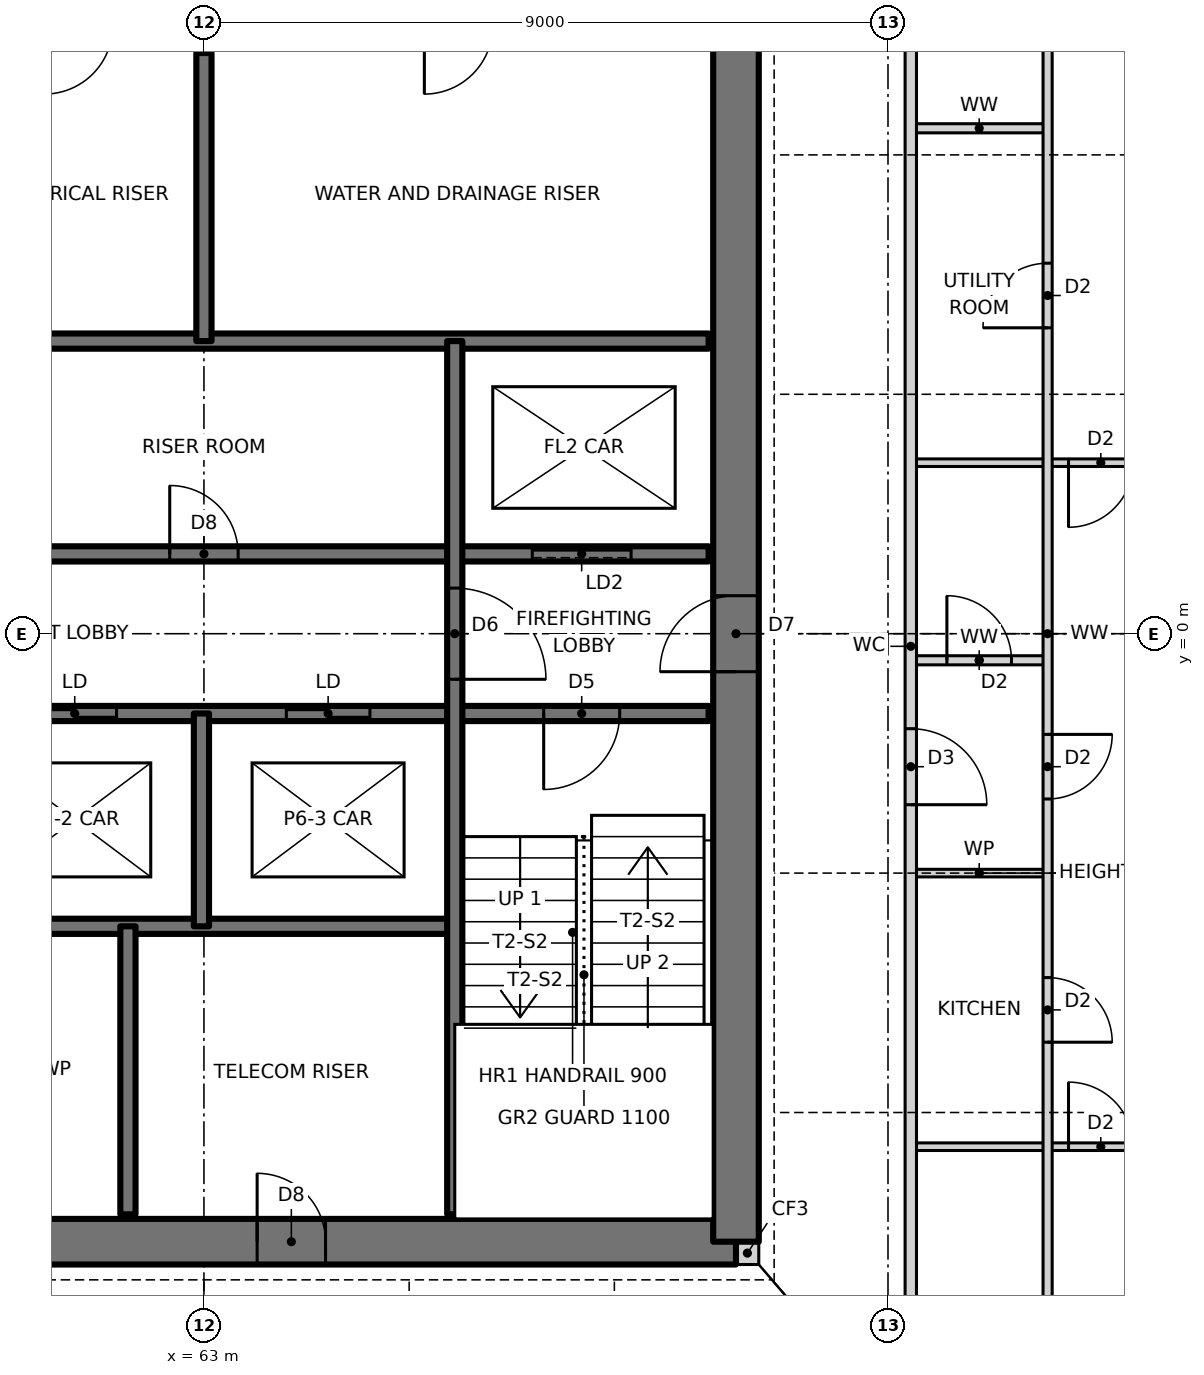
"""IFC4 building model, lengths in metres.
Left out: names, types, materials, properties, quantities, classifications, styles, units other than length and angle.
Written with IfcOpenShell. Run it as: python <this file> out.ifc"""

import sys

from ifc_helpers import new_model, si_unit, direction, frame, frame_2d, origin, place, context, subcontext, project, spatial, rectangle, extrude, element, fill, save


model = new_model("IFC4")
c1 = context("Model", 3, precision=1e-05, world=origin(), true_north=direction((0.0, 1.0)))
c2 = subcontext(c1, "Body", "Model", "MODEL_VIEW")
j1 = project(units=[si_unit("LENGTHUNIT", "METRE"), si_unit("PLANEANGLEUNIT", "RADIAN")], contexts=[c1])
p1 = place(None, origin())
s1 = spatial("IfcSite", under=j1, at=p1, CompositionType="ELEMENT")
p2 = place(p1, origin())
s2 = spatial("IfcBuilding", under=s1, at=p2, CompositionType="ELEMENT")
p3 = place(p2, frame((0.0, 0.0, 18.5)))
s3 = spatial("IfcBuildingStorey", under=s2, at=p3, CompositionType="ELEMENT", Elevation=18.5)
p4 = place(p3, frame((70.0, -8.15, 0.0), z_axis=(0.0, 0.0, 1.0), x_axis=(1.0, 0.0, 0.0)))
e1 = element("IfcWall", 1, at=p4, inside=s3, PredefinedType="SOLIDWALL", context=c2, shape_type="SweptSolid", body=[
    extrude(rectangle(XDim=0.3, YDim=0.3, at=frame_2d((0.15, 0.0))), origin(), (0.0, 0.0, 1.0), 3.5),
])
p5 = place(p3, frame((56.0, -8.0, 0.0), z_axis=(0.0, 0.0, 1.0), x_axis=(1.0, 0.0, 0.0)))
e2 = element("IfcWall", 2, at=p5, inside=s3, PredefinedType="SHEAR", context=c2, shape_type="SweptSolid", body=[
    extrude(rectangle(XDim=14.0, YDim=0.6, at=frame_2d((7.0, 0.0))), origin(), (0.0, 0.0, 1.0), 3.5),
])
p6 = place(p5, frame((2.7, 0.0, 0.0)))
e3 = element("IfcOpeningElement", 3, at=p6, cuts=e2, PredefinedType="OPENING", context=c2, shape_type="SweptSolid", body=[
    extrude(rectangle(XDim=0.9, YDim=2.1, at=frame_2d((0.45, 1.05))), frame((0.0, 0.31, 0.0), z_axis=(0.0, -1.0, 0.0), x_axis=(1.0, 0.0, 0.0)), (0.0, 0.0, 1.0), 0.62),
])
p7 = place(p5, frame((7.7, 0.0, 0.0)))
e4 = element("IfcOpeningElement", 4, at=p7, cuts=e2, PredefinedType="OPENING", context=c2, shape_type="SweptSolid", body=[
    extrude(rectangle(XDim=0.9, YDim=2.1, at=frame_2d((0.45, 1.05))), frame((0.0, 0.31, 0.0), z_axis=(0.0, -1.0, 0.0), x_axis=(1.0, 0.0, 0.0)), (0.0, 0.0, 1.0), 0.62),
])
p8 = place(p3, frame((70.0, -8.0, 0.0), z_axis=(0.0, 0.0, 1.0), x_axis=(0.0, 1.0, 0.0)))
e5 = element("IfcWall", 5, at=p8, inside=s3, PredefinedType="SHEAR", context=c2, shape_type="SweptSolid", body=[
    extrude(rectangle(XDim=16.0, YDim=0.6, at=frame_2d((8.0, 0.0))), origin(), (0.0, 0.0, 1.0), 3.5),
])
p9 = place(p8, frame((7.5, 0.0, 0.0)))
e6 = element("IfcOpeningElement", 6, at=p9, cuts=e5, PredefinedType="OPENING", context=c2, shape_type="SweptSolid", body=[
    extrude(rectangle(XDim=1.0, YDim=2.1, at=frame_2d((0.5, 1.05))), frame((0.0, 0.31, 0.0), z_axis=(0.0, -1.0, 0.0), x_axis=(1.0, 0.0, 0.0)), (0.0, 0.0, 1.0), 0.62),
])
p10 = place(p3, frame((72.3, -6.75, 0.0), z_axis=(0.0, 0.0, 1.0), x_axis=(1.0, 0.0, 0.0)))
e7 = element("IfcWall", 7, at=p10, inside=s3, PredefinedType="PARTITIONING", context=c2, shape_type="SweptSolid", body=[
    extrude(rectangle(XDim=7.14, YDim=0.1, at=frame_2d((3.57, 0.0))), origin(), (0.0, 0.0, 1.0), 3.27),
])
p11 = place(p10, frame((2.075, 0.0, 0.0)))
e8 = element("IfcOpeningElement", 8, at=p11, cuts=e7, PredefinedType="OPENING", context=c2, shape_type="SweptSolid", body=[
    extrude(rectangle(XDim=0.85, YDim=2.1, at=frame_2d((0.425, 1.05))), frame((0.0, 0.06, 0.0), z_axis=(0.0, -1.0, 0.0), x_axis=(1.0, 0.0, 0.0)), (0.0, 0.0, 1.0), 0.12),
])
p12 = place(p3, frame((56.36, -3.85, 0.0), z_axis=(0.0, 0.0, 1.0), x_axis=(1.0, 0.0, 0.0)))
e9 = element("IfcWall", 9, at=p12, inside=s3, PredefinedType="SOLIDWALL", context=c2, shape_type="SweptSolid", body=[
    extrude(rectangle(XDim=9.94, YDim=0.2, at=frame_2d((4.97, 0.0))), origin(), (0.0, 0.0, 1.0), 3.5),
])
p13 = place(p3, frame((72.3, -3.15, 0.0), z_axis=(0.0, 0.0, 1.0), x_axis=(1.0, 0.0, 0.0)))
e10 = element("IfcWall", 10, at=p13, inside=s3, PredefinedType="PARTITIONING", context=c2, shape_type="SweptSolid", body=[
    extrude(rectangle(XDim=1.8, YDim=0.1, at=frame_2d((0.9, 0.0))), origin(), (0.0, 0.0, 1.0), 2.587),
])
p14 = place(p3, frame((56.36, -1.05, 0.0), z_axis=(0.0, 0.0, 1.0), x_axis=(1.0, 0.0, 0.0)))
e11 = element("IfcWall", 11, at=p14, inside=s3, PredefinedType="SOLIDWALL", context=c2, shape_type="SweptSolid", body=[
    extrude(rectangle(XDim=13.28, YDim=0.2, at=frame_2d((6.64, 0.0))), origin(), (0.0, 0.0, 1.0), 3.5),
])
p15 = place(p14, frame((11.11, 0.0, 0.0)))
e12 = element("IfcOpeningElement", 12, at=p15, cuts=e11, PredefinedType="OPENING", context=c2, shape_type="SweptSolid", body=[
    extrude(rectangle(XDim=1.0, YDim=2.1, at=frame_2d((0.5, 1.05))), frame((0.0, 0.11, 0.0), z_axis=(0.0, -1.0, 0.0), x_axis=(1.0, 0.0, 0.0)), (0.0, 0.0, 1.0), 0.22),
])
p16 = place(p14, frame((1.087, 0.0, 0.0)))
e13 = element("IfcOpeningElement", 13, at=p16, cuts=e11, PredefinedType="OPENING", context=c2, shape_type="SweptSolid", body=[
    extrude(rectangle(XDim=1.1, YDim=2.1, at=frame_2d((0.55, 1.05))), frame((0.0, 0.11, 0.0), z_axis=(0.0, -1.0, 0.0), x_axis=(1.0, 0.0, 0.0)), (0.0, 0.0, 1.0), 0.22),
])
p17 = place(p14, frame((4.39, 0.0, 0.0)))
e14 = element("IfcOpeningElement", 14, at=p17, cuts=e11, PredefinedType="OPENING", context=c2, shape_type="SweptSolid", body=[
    extrude(rectangle(XDim=1.1, YDim=2.1, at=frame_2d((0.55, 1.05))), frame((0.0, 0.11, 0.0), z_axis=(0.0, -1.0, 0.0), x_axis=(1.0, 0.0, 0.0)), (0.0, 0.0, 1.0), 0.22),
])
p18 = place(p14, frame((7.724, 0.0, 0.0)))
e15 = element("IfcOpeningElement", 15, at=p18, cuts=e11, PredefinedType="OPENING", context=c2, shape_type="SweptSolid", body=[
    extrude(rectangle(XDim=1.1, YDim=2.1, at=frame_2d((0.55, 1.05))), frame((0.0, 0.11, 0.0), z_axis=(0.0, -1.0, 0.0), x_axis=(1.0, 0.0, 0.0)), (0.0, 0.0, 1.0), 0.22),
])
p19 = place(p3, frame((72.3, -0.35, 0.0), z_axis=(0.0, 0.0, 1.0), x_axis=(1.0, 0.0, 0.0)))
e16 = element("IfcWall", 16, at=p19, inside=s3, PredefinedType="PARTITIONING", context=c2, shape_type="SweptSolid", body=[
    extrude(rectangle(XDim=1.8, YDim=0.12, at=frame_2d((0.9, 0.0))), origin(), (0.0, 0.0, 1.0), 3.27),
])
p20 = place(p19, frame((0.475, 0.0, 0.0)))
e17 = element("IfcOpeningElement", 17, at=p20, cuts=e16, PredefinedType="OPENING", context=c2, shape_type="SweptSolid", body=[
    extrude(rectangle(XDim=0.85, YDim=2.1, at=frame_2d((0.425, 1.05))), frame((0.0, 0.07, 0.0), z_axis=(0.0, -1.0, 0.0), x_axis=(1.0, 0.0, 0.0)), (0.0, 0.0, 1.0), 0.14),
])
p21 = place(p3, frame((56.36, 1.05, 0.0), z_axis=(0.0, 0.0, 1.0), x_axis=(1.0, 0.0, 0.0)))
e18 = element("IfcWall", 18, at=p21, inside=s3, PredefinedType="SOLIDWALL", context=c2, shape_type="SweptSolid", body=[
    extrude(rectangle(XDim=13.28, YDim=0.2, at=frame_2d((6.64, 0.0))), origin(), (0.0, 0.0, 1.0), 3.5),
])
p22 = place(p21, frame((1.17, 0.0, 0.0)))
e19 = element("IfcOpeningElement", 19, at=p22, cuts=e18, PredefinedType="OPENING", context=c2, shape_type="SweptSolid", body=[
    extrude(rectangle(XDim=1.0, YDim=2.1, at=frame_2d((0.5, 1.05))), frame((0.0, 0.11, 0.0), z_axis=(0.0, -1.0, 0.0), x_axis=(1.0, 0.0, 0.0)), (0.0, 0.0, 1.0), 0.22),
])
p23 = place(p21, frame((6.19, 0.0, 0.0)))
e20 = element("IfcOpeningElement", 20, at=p23, cuts=e18, PredefinedType="OPENING", context=c2, shape_type="SweptSolid", body=[
    extrude(rectangle(XDim=0.9, YDim=2.1, at=frame_2d((0.45, 1.05))), frame((0.0, 0.11, 0.0), z_axis=(0.0, -1.0, 0.0), x_axis=(1.0, 0.0, 0.0)), (0.0, 0.0, 1.0), 0.22),
])
p24 = place(p21, frame((10.96, 0.0, 0.0)))
e21 = element("IfcOpeningElement", 21, at=p24, cuts=e18, PredefinedType="OPENING", context=c2, shape_type="SweptSolid", body=[
    extrude(rectangle(XDim=1.3, YDim=2.1, at=frame_2d((0.65, 1.05))), frame((0.0, 0.11, 0.0), z_axis=(0.0, -1.0, 0.0), x_axis=(1.0, 0.0, 0.0)), (0.0, 0.0, 1.0), 0.22),
])
p25 = place(p3, frame((72.3, 2.25, 0.0), z_axis=(0.0, 0.0, 1.0), x_axis=(1.0, 0.0, 0.0)))
e22 = element("IfcWall", 22, at=p25, inside=s3, PredefinedType="PARTITIONING", context=c2, shape_type="SweptSolid", body=[
    extrude(rectangle(XDim=7.14, YDim=0.1, at=frame_2d((3.57, 0.0))), origin(), (0.0, 0.0, 1.0), 3.27),
])
p26 = place(p25, frame((2.075, 0.0, 0.0)))
e23 = element("IfcOpeningElement", 23, at=p26, cuts=e22, PredefinedType="OPENING", context=c2, shape_type="SweptSolid", body=[
    extrude(rectangle(XDim=0.85, YDim=2.1, at=frame_2d((0.425, 1.05))), frame((0.0, 0.06, 0.0), z_axis=(0.0, -1.0, 0.0), x_axis=(1.0, 0.0, 0.0)), (0.0, 0.0, 1.0), 0.12),
])
p27 = place(p3, frame((59.7, 3.85, 0.0), z_axis=(0.0, 0.0, 1.0), x_axis=(1.0, 0.0, 0.0)))
e24 = element("IfcWall", 24, at=p27, inside=s3, PredefinedType="SOLIDWALL", context=c2, shape_type="SweptSolid", body=[
    extrude(rectangle(XDim=9.94, YDim=0.2, at=frame_2d((4.97, 0.0))), origin(), (0.0, 0.0, 1.0), 3.5),
])
p28 = place(p3, frame((72.3, 6.65, 0.0), z_axis=(0.0, 0.0, 1.0), x_axis=(1.0, 0.0, 0.0)))
e25 = element("IfcWall", 25, at=p28, inside=s3, PredefinedType="PARTITIONING", context=c2, shape_type="SweptSolid", body=[
    extrude(rectangle(XDim=1.8, YDim=0.12, at=frame_2d((0.9, 0.0))), origin(), (0.0, 0.0, 1.0), 3.27),
])
p29 = place(p3, frame((74.1, -12.614, 0.0), z_axis=(0.0, 0.0, 1.0), x_axis=(0.0, 1.0, 0.0)))
e26 = element("IfcWall", 26, at=p29, inside=s3, PredefinedType="PARTITIONING", context=c2, shape_type="SweptSolid", body=[
    extrude(rectangle(XDim=25.228, YDim=0.12, at=frame_2d((12.614, 0.0))), origin(), (0.0, 0.0, 1.0), 3.27),
])
p30 = place(p29, frame((7.239, 0.0, 0.0)))
e27 = element("IfcOpeningElement", 27, at=p30, cuts=e26, PredefinedType="OPENING", context=c2, shape_type="SweptSolid", body=[
    extrude(rectangle(XDim=0.85, YDim=2.1, at=frame_2d((0.425, 1.05))), frame((0.0, 0.07, 0.0), z_axis=(0.0, -1.0, 0.0), x_axis=(1.0, 0.0, 0.0)), (0.0, 0.0, 1.0), 0.14),
])
p31 = place(p29, frame((10.439, 0.0, 0.0)))
e28 = element("IfcOpeningElement", 28, at=p31, cuts=e26, PredefinedType="OPENING", context=c2, shape_type="SweptSolid", body=[
    extrude(rectangle(XDim=0.85, YDim=2.1, at=frame_2d((0.425, 1.05))), frame((0.0, 0.07, 0.0), z_axis=(0.0, -1.0, 0.0), x_axis=(1.0, 0.0, 0.0)), (0.0, 0.0, 1.0), 0.14),
])
p32 = place(p29, frame((2.507, 0.0, 0.0)))
e29 = element("IfcOpeningElement", 29, at=p32, cuts=e26, PredefinedType="OPENING", context=c2, shape_type="SweptSolid", body=[
    extrude(rectangle(XDim=0.85, YDim=2.1, at=frame_2d((0.425, 1.05))), frame((0.0, 0.07, 0.0), z_axis=(0.0, -1.0, 0.0), x_axis=(1.0, 0.0, 0.0)), (0.0, 0.0, 1.0), 0.14),
])
p33 = place(p29, frame((16.639, 0.0, 0.0)))
e30 = element("IfcOpeningElement", 30, at=p33, cuts=e26, PredefinedType="OPENING", context=c2, shape_type="SweptSolid", body=[
    extrude(rectangle(XDim=0.85, YDim=2.1, at=frame_2d((0.425, 1.05))), frame((0.0, 0.07, 0.0), z_axis=(0.0, -1.0, 0.0), x_axis=(1.0, 0.0, 0.0)), (0.0, 0.0, 1.0), 0.14),
])
p34 = place(p29, frame((21.821, 0.0, 0.0)))
e31 = element("IfcOpeningElement", 31, at=p34, cuts=e26, PredefinedType="OPENING", context=c2, shape_type="SweptSolid", body=[
    extrude(rectangle(XDim=0.85, YDim=2.1, at=frame_2d((0.425, 1.05))), frame((0.0, 0.07, 0.0), z_axis=(0.0, -1.0, 0.0), x_axis=(1.0, 0.0, 0.0)), (0.0, 0.0, 1.0), 0.14),
])
p35 = place(p3, frame((72.3, -10.9, 0.0), z_axis=(0.0, 0.0, 1.0), x_axis=(0.0, 1.0, 0.0)))
e32 = element("IfcWall", 32, at=p35, inside=s3, PredefinedType="PARTITIONING", context=c2, shape_type="SweptSolid", body=[
    extrude(rectangle(XDim=21.468, YDim=0.15, at=frame_2d((10.734, 0.0))), origin(), (0.0, 0.0, 1.0), 3.27),
])
p36 = place(p35, frame((8.65, 0.0, 0.0)))
e33 = element("IfcOpeningElement", 33, at=p36, cuts=e32, PredefinedType="OPENING", context=c2, shape_type="SweptSolid", body=[
    extrude(rectangle(XDim=1.0, YDim=2.1, at=frame_2d((0.5, 1.05))), frame((0.0, 0.085, 0.0), z_axis=(0.0, -1.0, 0.0), x_axis=(1.0, 0.0, 0.0)), (0.0, 0.0, 1.0), 0.17),
])
p37 = place(p3, frame((66.3, -7.64, 0.0), z_axis=(0.0, 0.0, 1.0), x_axis=(0.0, 1.0, 0.0)))
e34 = element("IfcWall", 34, at=p37, inside=s3, PredefinedType="SOLIDWALL", context=c2, shape_type="SweptSolid", body=[
    extrude(rectangle(XDim=11.49, YDim=0.2, at=frame_2d((5.745, 0.0))), origin(), (0.0, 0.0, 1.0), 3.5),
])
p38 = place(p37, frame((7.04, 0.0, 0.0)))
e35 = element("IfcOpeningElement", 35, at=p38, cuts=e34, PredefinedType="OPENING", context=c2, shape_type="SweptSolid", body=[
    extrude(rectangle(XDim=1.2, YDim=2.1, at=frame_2d((0.6, 1.05))), frame((0.0, 0.11, 0.0), z_axis=(0.0, -1.0, 0.0), x_axis=(1.0, 0.0, 0.0)), (0.0, 0.0, 1.0), 0.22),
])
p39 = place(p3, frame((63.0, 3.85, 0.0), z_axis=(0.0, 0.0, 1.0), x_axis=(0.0, 1.0, 0.0)))
e36 = element("IfcWall", 36, at=p39, inside=s3, PredefinedType="SOLIDWALL", context=c2, shape_type="SweptSolid", body=[
    extrude(rectangle(XDim=3.79, YDim=0.2, at=frame_2d((1.895, 0.0))), origin(), (0.0, 0.0, 1.0), 3.5),
])
p40 = place(p3, frame((62.967, -3.85, 0.0), z_axis=(0.0, 0.0, 1.0), x_axis=(0.0, 1.0, 0.0)))
e37 = element("IfcWall", 37, at=p40, inside=s3, PredefinedType="SOLIDWALL", context=c2, shape_type="SweptSolid", body=[
    extrude(rectangle(XDim=2.8, YDim=0.2, at=frame_2d((1.4, 0.0))), origin(), (0.0, 0.0, 1.0), 3.5),
])
p41 = place(p3, frame((62.0, -7.64, 0.0), z_axis=(0.0, 0.0, 1.0), x_axis=(0.0, 1.0, 0.0)))
e38 = element("IfcWall", 38, at=p41, inside=s3, PredefinedType="SOLIDWALL", context=c2, shape_type="SweptSolid", body=[
    extrude(rectangle(XDim=3.79, YDim=0.2, at=frame_2d((1.895, 0.0))), origin(), (0.0, 0.0, 1.0), 3.5),
])
p42 = place(p15, frame((1.0, 0.0, 0.0), z_axis=(0.0, 0.0, 1.0), x_axis=(-1.0, 0.0, 0.0)))
e39 = element("IfcDoor", 39, at=p42, inside=s3, OperationType="SINGLE_SWING_RIGHT", PredefinedType="DOOR", context=c2, shape_type="SweptSolid", body=[
    extrude(rectangle(XDim=1.0, YDim=2.1, at=frame_2d((0.5, 1.05))), frame((0.0, 0.025, 0.0), z_axis=(0.0, -1.0, 0.0), x_axis=(1.0, 0.0, 0.0)), (0.0, 0.0, 1.0), 0.05),
])
fill(e12, e39)
p43 = place(p38, frame((1.2, 0.0, 0.0), z_axis=(0.0, 0.0, 1.0), x_axis=(-1.0, 0.0, 0.0)))
e40 = element("IfcDoor", 40, at=p43, inside=s3, OperationType="SINGLE_SWING_RIGHT", PredefinedType="DOOR", context=c2, shape_type="SweptSolid", body=[
    extrude(rectangle(XDim=1.2, YDim=2.1, at=frame_2d((0.6, 1.05))), frame((0.0, 0.025, 0.0), z_axis=(0.0, -1.0, 0.0), x_axis=(1.0, 0.0, 0.0)), (0.0, 0.0, 1.0), 0.05),
])
fill(e35, e40)
p44 = place(p23, origin())
e41 = element("IfcDoor", 41, at=p44, inside=s3, OperationType="SINGLE_SWING_LEFT", PredefinedType="DOOR", context=c2, shape_type="SweptSolid", body=[
    extrude(rectangle(XDim=0.9, YDim=2.1, at=frame_2d((0.45, 1.05))), frame((0.0, 0.025, 0.0), z_axis=(0.0, -1.0, 0.0), x_axis=(1.0, 0.0, 0.0)), (0.0, 0.0, 1.0), 0.05),
])
fill(e20, e41)
p45 = place(p30, frame((0.85, 0.0, 0.0), z_axis=(0.0, 0.0, 1.0), x_axis=(-1.0, 0.0, 0.0)))
e42 = element("IfcDoor", 42, at=p45, inside=s3, OperationType="SINGLE_SWING_RIGHT", PredefinedType="DOOR", context=c2, shape_type="SweptSolid", body=[
    extrude(rectangle(XDim=0.85, YDim=2.1, at=frame_2d((0.425, 1.05))), frame((0.0, 0.025, 0.0), z_axis=(0.0, -1.0, 0.0), x_axis=(1.0, 0.0, 0.0)), (0.0, 0.0, 1.0), 0.05),
])
fill(e27, e42)
p46 = place(p36, frame((1.0, 0.0, 0.0), z_axis=(0.0, 0.0, 1.0), x_axis=(-1.0, 0.0, 0.0)))
e43 = element("IfcDoor", 43, at=p46, inside=s3, OperationType="SINGLE_SWING_RIGHT", PredefinedType="DOOR", context=c2, shape_type="SweptSolid", body=[
    extrude(rectangle(XDim=1.0, YDim=2.1, at=frame_2d((0.5, 1.05))), frame((0.0, 0.025, 0.0), z_axis=(0.0, -1.0, 0.0), x_axis=(1.0, 0.0, 0.0)), (0.0, 0.0, 1.0), 0.05),
])
fill(e33, e43)
p47 = place(p31, frame((0.85, 0.0, 0.0), z_axis=(0.0, 0.0, 1.0), x_axis=(-1.0, 0.0, 0.0)))
e44 = element("IfcDoor", 44, at=p47, inside=s3, OperationType="SINGLE_SWING_LEFT", PredefinedType="DOOR", context=c2, shape_type="SweptSolid", body=[
    extrude(rectangle(XDim=0.85, YDim=2.1, at=frame_2d((0.425, 1.05))), frame((0.0, 0.025, 0.0), z_axis=(0.0, -1.0, 0.0), x_axis=(1.0, 0.0, 0.0)), (0.0, 0.0, 1.0), 0.05),
])
fill(e28, e44)
p48 = place(p20, origin())
e45 = element("IfcDoor", 45, at=p48, inside=s3, OperationType="SINGLE_SWING_LEFT", PredefinedType="DOOR", context=c2, shape_type="SweptSolid", body=[
    extrude(rectangle(XDim=0.85, YDim=2.1, at=frame_2d((0.425, 1.05))), frame((0.0, 0.025, 0.0), z_axis=(0.0, -1.0, 0.0), x_axis=(1.0, 0.0, 0.0)), (0.0, 0.0, 1.0), 0.05),
])
fill(e17, e45)
p49 = place(p11, origin())
e46 = element("IfcDoor", 46, at=p49, inside=s3, OperationType="SINGLE_SWING_LEFT", PredefinedType="DOOR", context=c2, shape_type="SweptSolid", body=[
    extrude(rectangle(XDim=0.85, YDim=2.1, at=frame_2d((0.425, 1.05))), frame((0.0, 0.025, 0.0), z_axis=(0.0, -1.0, 0.0), x_axis=(1.0, 0.0, 0.0)), (0.0, 0.0, 1.0), 0.05),
])
fill(e8, e46)
p50 = place(p26, frame((0.85, 0.0, 0.0), z_axis=(0.0, 0.0, 1.0), x_axis=(-1.0, 0.0, 0.0)))
e47 = element("IfcDoor", 47, at=p50, inside=s3, OperationType="SINGLE_SWING_RIGHT", PredefinedType="DOOR", context=c2, shape_type="SweptSolid", body=[
    extrude(rectangle(XDim=0.85, YDim=2.1, at=frame_2d((0.425, 1.05))), frame((0.0, 0.025, 0.0), z_axis=(0.0, -1.0, 0.0), x_axis=(1.0, 0.0, 0.0)), (0.0, 0.0, 1.0), 0.05),
])
fill(e23, e47)
p51 = place(p33, origin())
e48 = element("IfcDoor", 48, at=p51, inside=s3, OperationType="SINGLE_SWING_LEFT", PredefinedType="DOOR", context=c2, shape_type="SweptSolid", body=[
    extrude(rectangle(XDim=0.85, YDim=2.1, at=frame_2d((0.425, 1.05))), frame((0.0, 0.025, 0.0), z_axis=(0.0, -1.0, 0.0), x_axis=(1.0, 0.0, 0.0)), (0.0, 0.0, 1.0), 0.05),
])
fill(e30, e48)
p52 = place(p9, origin())
e49 = element("IfcDoor", 49, at=p52, inside=s3, OperationType="SINGLE_SWING_LEFT", PredefinedType="DOOR", context=c2, shape_type="SweptSolid", body=[
    extrude(rectangle(XDim=1.0, YDim=2.1, at=frame_2d((0.5, 1.05))), frame((0.0, 0.025, 0.0), z_axis=(0.0, -1.0, 0.0), x_axis=(1.0, 0.0, 0.0)), (0.0, 0.0, 1.0), 0.05),
])
fill(e6, e49)
p53 = place(p7, origin())
e50 = element("IfcDoor", 50, at=p53, inside=s3, OperationType="SINGLE_SWING_LEFT", PredefinedType="DOOR", context=c2, shape_type="SweptSolid", body=[
    extrude(rectangle(XDim=0.9, YDim=2.1, at=frame_2d((0.45, 1.05))), frame((0.0, 0.025, 0.0), z_axis=(0.0, -1.0, 0.0), x_axis=(1.0, 0.0, 0.0)), (0.0, 0.0, 1.0), 0.05),
])
fill(e4, e50)
p54 = place(p17, origin())
e51 = element("IfcDoor", 51, at=p54, inside=s3, OperationType="DOUBLE_DOOR_SLIDING", PredefinedType="DOOR", context=c2, shape_type="SweptSolid", body=[
    extrude(rectangle(XDim=1.1, YDim=2.1, at=frame_2d((0.55, 1.05))), frame((0.0, 0.025, 0.0), z_axis=(0.0, -1.0, 0.0), x_axis=(1.0, 0.0, 0.0)), (0.0, 0.0, 1.0), 0.05),
])
fill(e14, e51)
p55 = place(p18, origin())
e52 = element("IfcDoor", 52, at=p55, inside=s3, OperationType="DOUBLE_DOOR_SLIDING", PredefinedType="DOOR", context=c2, shape_type="SweptSolid", body=[
    extrude(rectangle(XDim=1.1, YDim=2.1, at=frame_2d((0.55, 1.05))), frame((0.0, 0.025, 0.0), z_axis=(0.0, -1.0, 0.0), x_axis=(1.0, 0.0, 0.0)), (0.0, 0.0, 1.0), 0.05),
])
fill(e15, e52)
p56 = place(p24, origin())
e53 = element("IfcDoor", 53, at=p56, inside=s3, OperationType="SLIDING_TO_LEFT", PredefinedType="DOOR", context=c2, shape_type="SweptSolid", body=[
    extrude(rectangle(XDim=1.3, YDim=2.1, at=frame_2d((0.65, 1.05))), frame((0.0, 0.025, 0.0), z_axis=(0.0, -1.0, 0.0), x_axis=(1.0, 0.0, 0.0)), (0.0, 0.0, 1.0), 0.05),
])
fill(e21, e53)
save(model, sys.argv[1])
